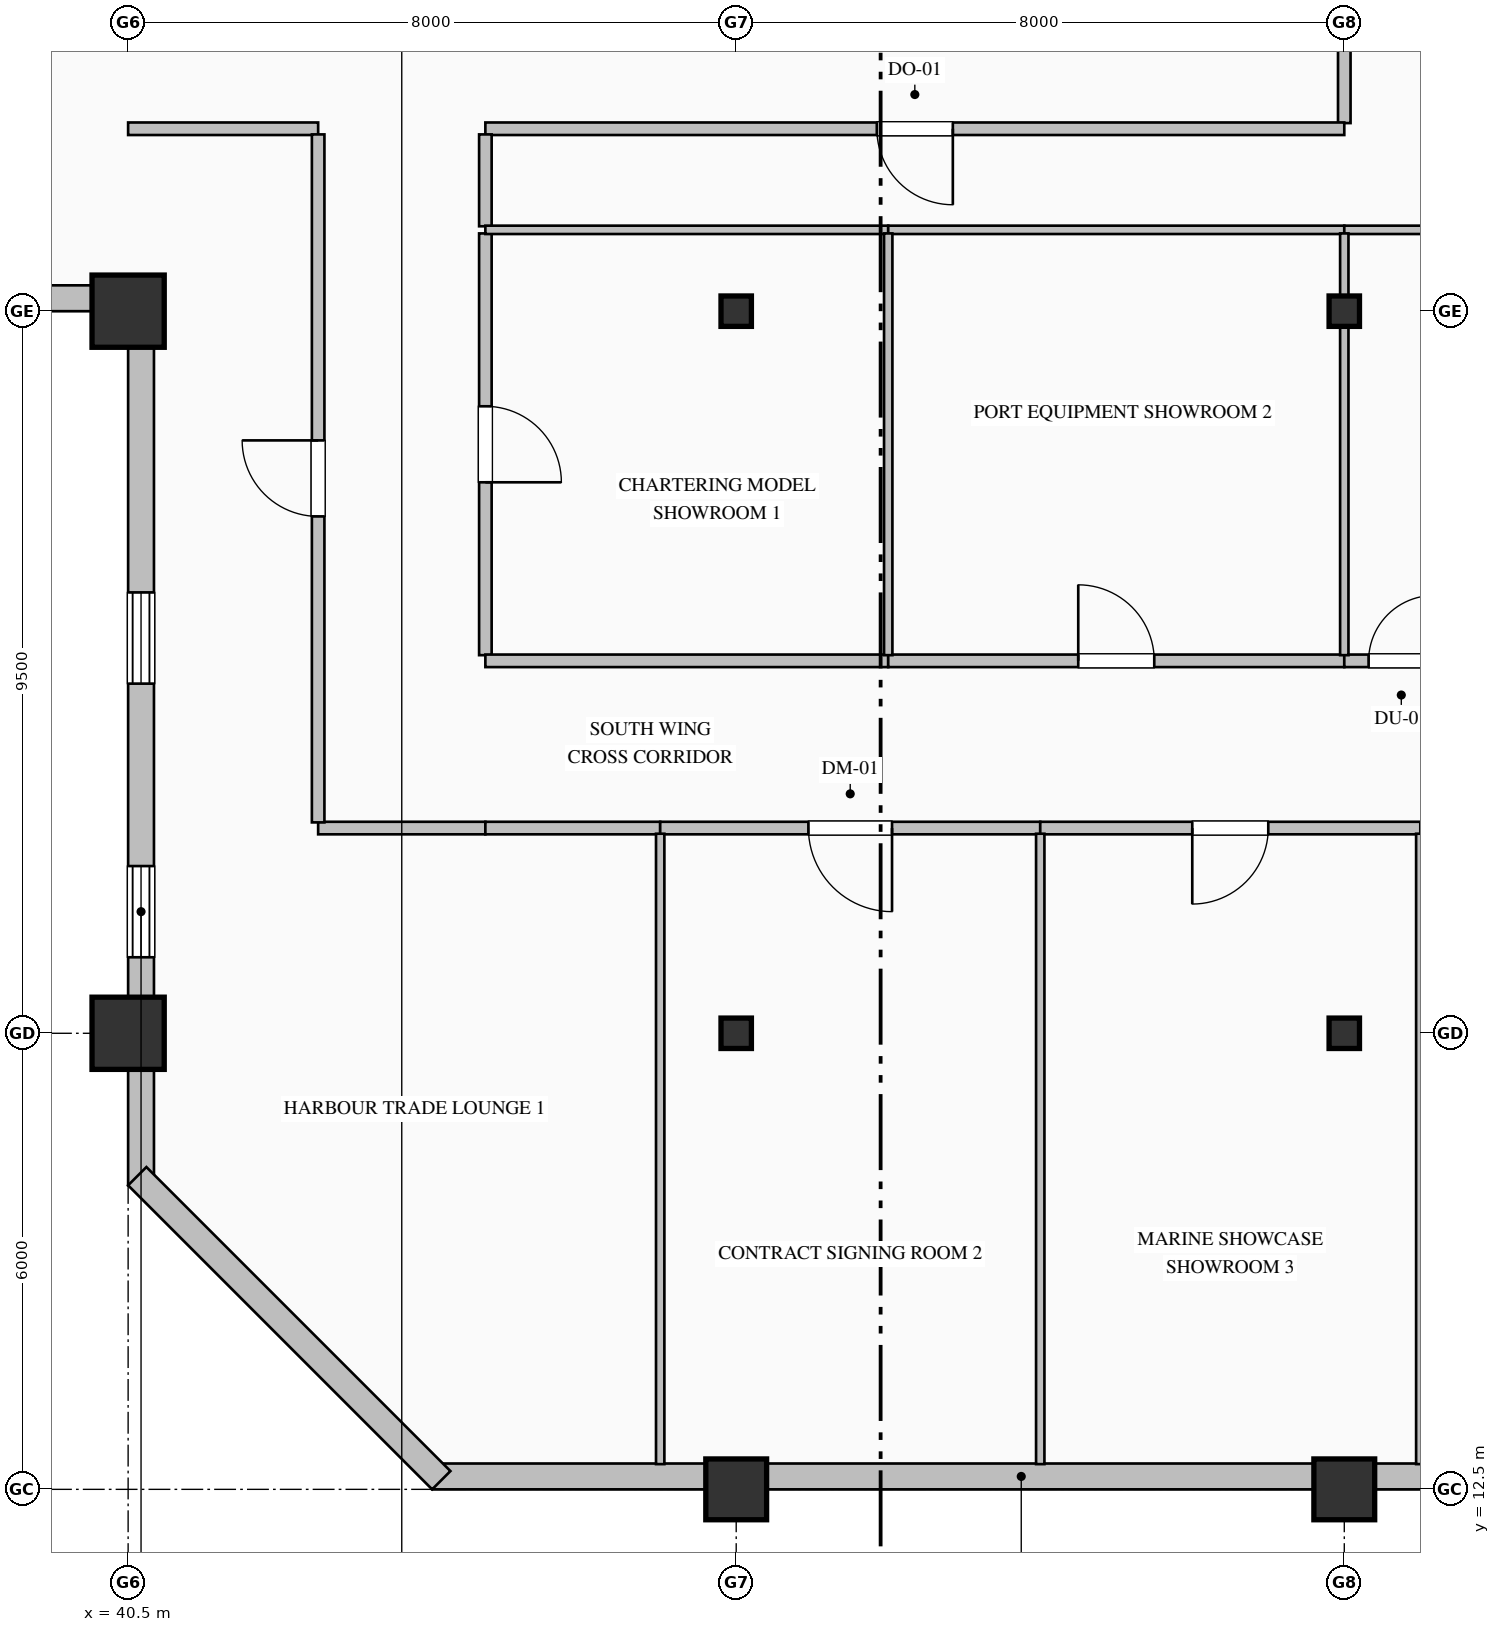
"""IFC4 building model, lengths in metres.
Left out: names, types, materials, properties, quantities, classifications, styles, units other than length and angle.
Written with IfcOpenShell. Run it as: python <this file> out.ifc"""

import sys

from ifc_helpers import new_model, si_unit, direction, frame, frame_2d, origin, origin_2d, place, context, subcontext, project, spatial, rectangle, hollow_rectangle, i_section, extrude, element, fill, save


model = new_model("IFC4")
c1 = context("Model", 3, precision=1e-05, world=origin(), true_north=direction((0.0, 1.0)))
c2 = subcontext(c1, "Body", "Model", "MODEL_VIEW")
j1 = project(units=[si_unit("LENGTHUNIT", "METRE"), si_unit("PLANEANGLEUNIT", "RADIAN")], contexts=[c1])
p1 = place(None, origin())
s1 = spatial("IfcSite", under=j1, at=p1, CompositionType="ELEMENT")
p2 = place(p1, origin())
s2 = spatial("IfcBuilding", under=s1, at=p2, CompositionType="ELEMENT")
p3 = place(p2, frame((0.0, 0.0, 269.8)))
s3 = spatial("IfcBuildingStorey", under=s2, at=p3, CompositionType="ELEMENT", Elevation=269.8)
for number, where, z_axis, x_axis in (
    (1, (40.5, 18.5, 0.0), (0.0, 0.0, 1.0), (1.0, 0.0, 0.0)),
    (2, (40.5, 28.0, 0.0), (0.0, 0.0, 1.0), (1.0, 0.0, 0.0)),
):
    element("IfcColumn", number, at=place(p3, frame(where, z_axis=z_axis, x_axis=x_axis)), inside=s3, PredefinedType="COLUMN", context=c2, shape_type="SweptSolid", body=[
        extrude(hollow_rectangle(XDim=0.95, YDim=0.95, WallThickness=0.036, at=origin_2d()), origin(), (0.0, 0.0, 1.0), 4.0),
    ])
p4 = place(p3, frame((48.5, 12.5, 0.0), z_axis=(0.0, 0.0, 1.0), x_axis=(1.0, 0.0, 0.0)))
e3 = element("IfcColumn", 3, at=p4, inside=s3, PredefinedType="COLUMN", context=c2, shape_type="SweptSolid", body=[
    extrude(hollow_rectangle(XDim=0.8, YDim=0.8, WallThickness=0.032, at=origin_2d()), origin(), (0.0, 0.0, 1.0), 4.0),
])
for number, where, z_axis, x_axis in (
    (4, (48.5, 18.5, 0.0), (0.0, 0.0, 1.0), (1.0, 0.0, 0.0)),
    (5, (48.5, 28.0, 0.0), (0.0, 0.0, 1.0), (1.0, 0.0, 0.0)),
):
    element("IfcColumn", number, at=place(p3, frame(where, z_axis=z_axis, x_axis=x_axis)), inside=s3, PredefinedType="COLUMN", context=c2, shape_type="SweptSolid", body=[
        extrude(i_section(OverallWidth=0.4, OverallDepth=0.4, WebThickness=0.013, FlangeThickness=0.021, FilletRadius=0.022, at=origin_2d()), origin(), (0.0, 0.0, 1.0), 4.0),
    ])
p5 = place(p3, frame((56.5, 12.5, 0.0), z_axis=(0.0, 0.0, 1.0), x_axis=(1.0, 0.0, 0.0)))
e6 = element("IfcColumn", 6, at=p5, inside=s3, PredefinedType="COLUMN", context=c2, shape_type="SweptSolid", body=[
    extrude(hollow_rectangle(XDim=0.8, YDim=0.8, WallThickness=0.032, at=origin_2d()), origin(), (0.0, 0.0, 1.0), 4.0),
])
for number, where, z_axis, x_axis in (
    (7, (56.5, 18.5, 0.0), (0.0, 0.0, 1.0), (1.0, 0.0, 0.0)),
    (8, (56.5, 28.0, 0.0), (0.0, 0.0, 1.0), (1.0, 0.0, 0.0)),
):
    element("IfcColumn", number, at=place(p3, frame(where, z_axis=z_axis, x_axis=x_axis)), inside=s3, PredefinedType="COLUMN", context=c2, shape_type="SweptSolid", body=[
        extrude(i_section(OverallWidth=0.4, OverallDepth=0.4, WebThickness=0.013, FlangeThickness=0.021, FilletRadius=0.022, at=origin_2d()), origin(), (0.0, 0.0, 1.0), 4.0),
    ])
p6 = place(p3, frame((40.67, 16.5, 0.0), z_axis=(0.0, 0.0, 1.0), x_axis=(0.0, 1.0, 0.0)))
e9 = element("IfcWall", 9, at=p6, inside=s3, PredefinedType="SOLIDWALL", context=c2, shape_type="SweptSolid", body=[
    extrude(rectangle(XDim=11.84, YDim=0.34, at=frame_2d((5.92, 0.0))), origin(), (0.0, 0.0, 1.0), 3.187),
])
p7 = place(p6, frame((3.0, 0.0, 0.7)))
e10 = element("IfcOpeningElement", 10, at=p7, cuts=e9, PredefinedType="OPENING", context=c2, shape_type="SweptSolid", body=[
    extrude(rectangle(XDim=1.2, YDim=1.85, at=frame_2d((0.6, 0.925))), frame((0.0, 0.18, 0.0), z_axis=(0.0, -1.0, 0.0), x_axis=(1.0, 0.0, 0.0)), (0.0, 0.0, 1.0), 0.36),
])
p8 = place(p6, frame((6.6, 0.0, 0.9)))
e11 = element("IfcOpeningElement", 11, at=p8, cuts=e9, PredefinedType="OPENING", context=c2, shape_type="SweptSolid", body=[
    extrude(rectangle(XDim=1.2, YDim=1.85, at=frame_2d((0.6, 0.925))), frame((0.0, 0.18, 0.0), z_axis=(0.0, -1.0, 0.0), x_axis=(1.0, 0.0, 0.0)), (0.0, 0.0, 1.0), 0.36),
])
p9 = place(p3, frame((40.52, 28.17, 0.0), z_axis=(0.0, 0.0, 1.0), x_axis=(-1.0, 0.0, 0.0)))
e12 = element("IfcWall", 12, at=p9, inside=s3, PredefinedType="SOLIDWALL", context=c2, shape_type="SweptSolid", body=[
    extrude(rectangle(XDim=27.52, YDim=0.34, at=frame_2d((13.76, 0.0))), origin(), (0.0, 0.0, 1.0), 3.187),
])
p10 = place(p9, frame((10.2, 0.0, 0.7)))
e13 = element("IfcOpeningElement", 13, at=p10, cuts=e12, PredefinedType="OPENING", context=c2, shape_type="SweptSolid", body=[
    extrude(rectangle(XDim=1.2, YDim=1.85, at=frame_2d((0.6, 0.925))), frame((0.0, 0.18, 0.0), z_axis=(0.0, -1.0, 0.0), x_axis=(1.0, 0.0, 0.0)), (0.0, 0.0, 1.0), 0.36),
])
p11 = place(p9, frame((13.8, 0.0, 0.9)))
e14 = element("IfcOpeningElement", 14, at=p11, cuts=e12, PredefinedType="OPENING", context=c2, shape_type="SweptSolid", body=[
    extrude(rectangle(XDim=1.2, YDim=1.85, at=frame_2d((0.6, 0.925))), frame((0.0, 0.18, 0.0), z_axis=(0.0, -1.0, 0.0), x_axis=(1.0, 0.0, 0.0)), (0.0, 0.0, 1.0), 0.36),
])
p12 = place(p9, frame((17.325, 0.0, 0.9)))
e15 = element("IfcOpeningElement", 15, at=p12, cuts=e12, PredefinedType="OPENING", context=c2, shape_type="SweptSolid", body=[
    extrude(rectangle(XDim=1.35, YDim=1.85, at=frame_2d((0.675, 0.925))), frame((0.0, 0.18, 0.0), z_axis=(0.0, -1.0, 0.0), x_axis=(1.0, 0.0, 0.0)), (0.0, 0.0, 1.0), 0.36),
])
p13 = place(p9, frame((21.0, 0.0, 0.7)))
e16 = element("IfcOpeningElement", 16, at=p13, cuts=e12, PredefinedType="OPENING", context=c2, shape_type="SweptSolid", body=[
    extrude(rectangle(XDim=1.2, YDim=1.85, at=frame_2d((0.6, 0.925))), frame((0.0, 0.18, 0.0), z_axis=(0.0, -1.0, 0.0), x_axis=(1.0, 0.0, 0.0)), (0.0, 0.0, 1.0), 0.36),
])
p14 = place(p3, frame((60.0, 12.67, 0.0), z_axis=(0.0, 0.0, 1.0), x_axis=(-1.0, 0.0, 0.0)))
e17 = element("IfcWall", 17, at=p14, inside=s3, PredefinedType="SOLIDWALL", context=c2, shape_type="SweptSolid", body=[
    extrude(rectangle(XDim=15.5, YDim=0.34, at=frame_2d((7.75, 0.0))), origin(), (0.0, 0.0, 1.0), 3.325),
])
p15 = place(p3, frame((44.62, 12.62, 0.0), z_axis=(0.0, 0.0, 1.0), x_axis=(-0.707106781187, 0.707106781187, 0.0)))
e18 = element("IfcWall", 18, at=p15, inside=s3, PredefinedType="SOLIDWALL", context=c2, shape_type="SweptSolid", body=[
    extrude(rectangle(XDim=5.657, YDim=0.34, at=frame_2d((2.828, 0.0))), origin(), (0.0, 0.0, 1.0), 3.775),
])
p16 = place(p3, frame((56.5, 36.0, 0.0), z_axis=(0.0, 0.0, 1.0), x_axis=(0.0, -1.0, 0.0)))
e19 = element("IfcWall", 19, at=p16, inside=s3, PredefinedType="PARTITIONING", context=c2, shape_type="SweptSolid", body=[
    extrude(rectangle(XDim=5.525, YDim=0.165, at=frame_2d((2.763, 0.0))), origin(), (0.0, 0.0, 1.0), 3.179),
])
p17 = place(p3, frame((56.5, 30.4, 0.0), z_axis=(0.0, 0.0, 1.0), x_axis=(-1.0, 0.0, 0.0)))
e20 = element("IfcWall", 20, at=p17, inside=s3, PredefinedType="PARTITIONING", context=c2, shape_type="SweptSolid", body=[
    extrude(rectangle(XDim=11.3, YDim=0.165, at=frame_2d((5.65, 0.0))), origin(), (0.0, 0.0, 1.0), 3.775),
])
p18 = place(p17, frame((5.15, 0.0, 0.0)))
e21 = element("IfcOpeningElement", 21, at=p18, cuts=e20, PredefinedType="OPENING", context=c2, shape_type="SweptSolid", body=[
    extrude(rectangle(XDim=1.0, YDim=2.15, at=frame_2d((0.5, 1.075))), frame((0.0, 0.093, 0.0), z_axis=(0.0, -1.0, 0.0), x_axis=(1.0, 0.0, 0.0)), (0.0, 0.0, 1.0), 0.185),
])
p19 = place(p3, frame((43.0, 30.4, 0.0), z_axis=(0.0, 0.0, 1.0), x_axis=(-1.0, 0.0, 0.0)))
e22 = element("IfcWall", 22, at=p19, inside=s3, PredefinedType="PARTITIONING", context=c2, shape_type="SweptSolid", body=[
    extrude(rectangle(XDim=2.5, YDim=0.165, at=frame_2d((1.25, 0.0))), origin(), (0.0, 0.0, 1.0), 3.775),
])
p20 = place(p3, frame((45.2, 30.325, 0.0), z_axis=(0.0, 0.0, 1.0), x_axis=(0.0, -1.0, 0.0)))
e23 = element("IfcWall", 23, at=p20, inside=s3, PredefinedType="PARTITIONING", context=c2, shape_type="SweptSolid", body=[
    extrude(rectangle(XDim=1.208, YDim=0.165, at=frame_2d((0.604, 0.0))), origin(), (0.0, 0.0, 1.0), 3.775),
])
p21 = place(p3, frame((45.2, 29.023, 0.0), z_axis=(0.0, 0.0, 1.0), x_axis=(0.0, -1.0, 0.0)))
e24 = element("IfcWall", 24, at=p21, inside=s3, PredefinedType="PARTITIONING", context=c2, shape_type="SweptSolid", body=[
    extrude(rectangle(XDim=5.548, YDim=0.165, at=frame_2d((2.774, 0.0))), origin(), (0.0, 0.0, 1.0), 3.775),
])
p22 = place(p21, frame((2.274, 0.0, 0.0)))
e25 = element("IfcOpeningElement", 25, at=p22, cuts=e24, PredefinedType="OPENING", context=c2, shape_type="SweptSolid", body=[
    extrude(rectangle(XDim=1.0, YDim=2.15, at=frame_2d((0.5, 1.075))), frame((0.0, 0.093, 0.0), z_axis=(0.0, -1.0, 0.0), x_axis=(1.0, 0.0, 0.0)), (0.0, 0.0, 1.0), 0.185),
])
p23 = place(p3, frame((45.2, 21.2, 0.0), z_axis=(0.0, 0.0, 1.0), x_axis=(-1.0, 0.0, 0.0)))
e26 = element("IfcWall", 26, at=p23, inside=s3, PredefinedType="PARTITIONING", context=c2, shape_type="SweptSolid", body=[
    extrude(rectangle(XDim=2.2, YDim=0.165, at=frame_2d((1.1, 0.0))), origin(), (0.0, 0.0, 1.0), 3.775),
])
p24 = place(p3, frame((43.0, 21.274, 0.0), z_axis=(0.0, 0.0, 1.0), x_axis=(0.0, 1.0, 0.0)))
e27 = element("IfcWall", 27, at=p24, inside=s3, PredefinedType="PARTITIONING", context=c2, shape_type="SweptSolid", body=[
    extrude(rectangle(XDim=9.051, YDim=0.165, at=frame_2d((4.525, 0.0))), origin(), (0.0, 0.0, 1.0), 3.775),
])
p25 = place(p24, frame((4.025, 0.0, 0.0)))
e28 = element("IfcOpeningElement", 28, at=p25, cuts=e27, PredefinedType="OPENING", context=c2, shape_type="SweptSolid", body=[
    extrude(rectangle(XDim=1.0, YDim=2.15, at=frame_2d((0.5, 1.075))), frame((0.0, 0.093, 0.0), z_axis=(0.0, -1.0, 0.0), x_axis=(1.0, 0.0, 0.0)), (0.0, 0.0, 1.0), 0.185),
])
p26 = place(p3, frame((45.2, 23.4, 0.0), z_axis=(0.0, 0.0, 1.0), x_axis=(1.0, 0.0, 0.0)))
e29 = element("IfcWall", 29, at=p26, inside=s3, PredefinedType="PARTITIONING", context=c2, shape_type="SweptSolid", body=[
    extrude(rectangle(XDim=5.3, YDim=0.165, at=frame_2d((2.65, 0.0))), origin(), (0.0, 0.0, 1.0), 3.467),
])
p27 = place(p3, frame((50.5, 23.4, 0.0), z_axis=(0.0, 0.0, 1.0), x_axis=(1.0, 0.0, 0.0)))
e30 = element("IfcWall", 30, at=p27, inside=s3, PredefinedType="PARTITIONING", context=c2, shape_type="SweptSolid", body=[
    extrude(rectangle(XDim=6.0, YDim=0.165, at=frame_2d((3.0, 0.0))), origin(), (0.0, 0.0, 1.0), 3.467),
])
p28 = place(p27, frame((2.5, 0.0, 0.0)))
e31 = element("IfcOpeningElement", 31, at=p28, cuts=e30, PredefinedType="OPENING", context=c2, shape_type="SweptSolid", body=[
    extrude(rectangle(XDim=1.0, YDim=2.15, at=frame_2d((0.5, 1.075))), frame((0.0, 0.093, 0.0), z_axis=(0.0, -1.0, 0.0), x_axis=(1.0, 0.0, 0.0)), (0.0, 0.0, 1.0), 0.185),
])
p29 = place(p3, frame((56.5, 23.4, 0.0), z_axis=(0.0, 0.0, 1.0), x_axis=(1.0, 0.0, 0.0)))
e32 = element("IfcWall", 32, at=p29, inside=s3, PredefinedType="PARTITIONING", context=c2, shape_type="SweptSolid", body=[
    extrude(rectangle(XDim=1.5, YDim=0.165, at=frame_2d((0.75, 0.0))), origin(), (0.0, 0.0, 1.0), 3.775),
])
p30 = place(p29, frame((0.32, 0.0, 0.0)))
e33 = element("IfcOpeningElement", 33, at=p30, cuts=e32, PredefinedType="OPENING", context=c2, shape_type="SweptSolid", body=[
    extrude(rectangle(XDim=0.86, YDim=2.1, at=frame_2d((0.43, 1.05))), frame((0.0, 0.093, 0.0), z_axis=(0.0, -1.0, 0.0), x_axis=(1.0, 0.0, 0.0)), (0.0, 0.0, 1.0), 0.185),
])
p31 = place(p3, frame((47.5, 21.2, 0.0), z_axis=(0.0, 0.0, 1.0), x_axis=(-1.0, 0.0, 0.0)))
e34 = element("IfcWall", 34, at=p31, inside=s3, PredefinedType="PARTITIONING", context=c2, shape_type="SweptSolid", body=[
    extrude(rectangle(XDim=2.3, YDim=0.165, at=frame_2d((1.15, 0.0))), origin(), (0.0, 0.0, 1.0), 3.775),
])
p32 = place(p3, frame((52.5, 21.2, 0.0), z_axis=(0.0, 0.0, 1.0), x_axis=(-1.0, 0.0, 0.0)))
e35 = element("IfcWall", 35, at=p32, inside=s3, PredefinedType="PARTITIONING", context=c2, shape_type="SweptSolid", body=[
    extrude(rectangle(XDim=5.0, YDim=0.165, at=frame_2d((2.5, 0.0))), origin(), (0.0, 0.0, 1.0), 3.775),
])
p33 = place(p32, frame((1.95, 0.0, 0.0)))
e36 = element("IfcOpeningElement", 36, at=p33, cuts=e35, PredefinedType="OPENING", context=c2, shape_type="SweptSolid", body=[
    extrude(rectangle(XDim=1.1, YDim=2.2, at=frame_2d((0.55, 1.1))), frame((0.0, 0.093, 0.0), z_axis=(0.0, -1.0, 0.0), x_axis=(1.0, 0.0, 0.0)), (0.0, 0.0, 1.0), 0.185),
])
p34 = place(p3, frame((57.5, 21.2, 0.0), z_axis=(0.0, 0.0, 1.0), x_axis=(-1.0, 0.0, 0.0)))
e37 = element("IfcWall", 37, at=p34, inside=s3, PredefinedType="PARTITIONING", context=c2, shape_type="SweptSolid", body=[
    extrude(rectangle(XDim=5.0, YDim=0.165, at=frame_2d((2.5, 0.0))), origin(), (0.0, 0.0, 1.0), 3.775),
])
p35 = place(p34, frame((2.0, 0.0, 0.0)))
e38 = element("IfcOpeningElement", 38, at=p35, cuts=e37, PredefinedType="OPENING", context=c2, shape_type="SweptSolid", body=[
    extrude(rectangle(XDim=1.0, YDim=2.15, at=frame_2d((0.5, 1.075))), frame((0.0, 0.093, 0.0), z_axis=(0.0, -1.0, 0.0), x_axis=(1.0, 0.0, 0.0)), (0.0, 0.0, 1.0), 0.185),
])
p36 = place(p3, frame((50.5, 29.07, 0.0), z_axis=(0.0, 0.0, 1.0), x_axis=(-1.0, 0.0, 0.0)))
e39 = element("IfcWall", 39, at=p36, inside=s3, PredefinedType="MOVABLE", context=c2, shape_type="SweptSolid", body=[
    extrude(rectangle(XDim=5.3, YDim=0.11, at=frame_2d((2.65, 0.0))), origin(), (0.0, 0.0, 1.0), 3.775),
])
p37 = place(p3, frame((56.5, 29.07, 0.0), z_axis=(0.0, 0.0, 1.0), x_axis=(-1.0, 0.0, 0.0)))
e40 = element("IfcWall", 40, at=p37, inside=s3, PredefinedType="MOVABLE", context=c2, shape_type="SweptSolid", body=[
    extrude(rectangle(XDim=6.0, YDim=0.11, at=frame_2d((3.0, 0.0))), origin(), (0.0, 0.0, 1.0), 3.775),
])
p38 = place(p3, frame((63.668, 29.07, 0.0), z_axis=(0.0, 0.0, 1.0), x_axis=(-1.0, 0.0, 0.0)))
e41 = element("IfcWall", 41, at=p38, inside=s3, PredefinedType="MOVABLE", context=c2, shape_type="SweptSolid", body=[
    extrude(rectangle(XDim=7.168, YDim=0.11, at=frame_2d((3.584, 0.0))), origin(), (0.0, 0.0, 1.0), 3.775),
])
p39 = place(p3, frame((50.5, 29.023, 0.0), z_axis=(0.0, 0.0, 1.0), x_axis=(0.0, -1.0, 0.0)))
e42 = element("IfcWall", 42, at=p39, inside=s3, PredefinedType="MOVABLE", context=c2, shape_type="SweptSolid", body=[
    extrude(rectangle(XDim=5.548, YDim=0.11, at=frame_2d((2.774, 0.0))), origin(), (0.0, 0.0, 1.0), 3.775),
])
p40 = place(p3, frame((56.5, 29.023, 0.0), z_axis=(0.0, 0.0, 1.0), x_axis=(0.0, -1.0, 0.0)))
e43 = element("IfcWall", 43, at=p40, inside=s3, PredefinedType="MOVABLE", context=c2, shape_type="SweptSolid", body=[
    extrude(rectangle(XDim=5.548, YDim=0.11, at=frame_2d((2.774, 0.0))), origin(), (0.0, 0.0, 1.0), 2.967),
])
for number, where, z_axis, x_axis in (
    (44, (47.5, 21.125, 0.0), (0.0, 0.0, 1.0), (0.0, -1.0, 0.0)),
    (45, (52.5, 21.125, 0.0), (0.0, 0.0, 1.0), (0.0, -1.0, 0.0)),
    (46, (57.5, 21.125, 0.0), (0.0, 0.0, 1.0), (0.0, -1.0, 0.0)),
):
    element("IfcWall", number, at=place(p3, frame(where, z_axis=z_axis, x_axis=x_axis)), inside=s3, PredefinedType="MOVABLE", context=c2, shape_type="SweptSolid", body=[
        extrude(rectangle(XDim=8.293, YDim=0.11, at=frame_2d((4.147, 0.0))), origin(), (0.0, 0.0, 1.0), 3.775),
    ])
p41 = place(p7, origin())
e47 = element("IfcWindow", 47, at=p41, inside=s3, PartitioningType="DOUBLE_PANEL_VERTICAL", PredefinedType="WINDOW", context=c2, shape_type="SweptSolid", body=[
    extrude(rectangle(XDim=1.2, YDim=1.85, at=frame_2d((0.6, 0.925))), frame((0.0, 0.15, 0.0), z_axis=(0.0, -1.0, 0.0), x_axis=(1.0, 0.0, 0.0)), (0.0, 0.0, 1.0), 0.06),
])
fill(e10, e47)
p42 = place(p8, origin())
e48 = element("IfcWindow", 48, at=p42, inside=s3, PartitioningType="DOUBLE_PANEL_VERTICAL", PredefinedType="WINDOW", context=c2, shape_type="SweptSolid", body=[
    extrude(rectangle(XDim=1.2, YDim=1.85, at=frame_2d((0.6, 0.925))), frame((0.0, 0.15, 0.0), z_axis=(0.0, -1.0, 0.0), x_axis=(1.0, 0.0, 0.0)), (0.0, 0.0, 1.0), 0.06),
])
fill(e11, e48)
p43 = place(p18, origin())
e49 = element("IfcDoor", 49, at=p43, inside=s3, OperationType="SINGLE_SWING_LEFT", PredefinedType="DOOR", context=c2, shape_type="SweptSolid", body=[
    extrude(rectangle(XDim=1.0, YDim=2.15, at=frame_2d((0.5, 1.075))), frame((0.0, 0.025, 0.0), z_axis=(0.0, -1.0, 0.0), x_axis=(1.0, 0.0, 0.0)), (0.0, 0.0, 1.0), 0.05),
])
fill(e21, e49)
p44 = place(p22, origin())
e50 = element("IfcDoor", 50, at=p44, inside=s3, OperationType="SINGLE_SWING_RIGHT", PredefinedType="DOOR", context=c2, shape_type="SweptSolid", body=[
    extrude(rectangle(XDim=1.0, YDim=2.15, at=frame_2d((0.5, 1.075))), frame((0.0, 0.025, 0.0), z_axis=(0.0, -1.0, 0.0), x_axis=(1.0, 0.0, 0.0)), (0.0, 0.0, 1.0), 0.05),
])
fill(e25, e50)
p45 = place(p28, origin())
e51 = element("IfcDoor", 51, at=p45, inside=s3, OperationType="SINGLE_SWING_LEFT", PredefinedType="DOOR", context=c2, shape_type="SweptSolid", body=[
    extrude(rectangle(XDim=1.0, YDim=2.15, at=frame_2d((0.5, 1.075))), frame((0.0, 0.025, 0.0), z_axis=(0.0, -1.0, 0.0), x_axis=(1.0, 0.0, 0.0)), (0.0, 0.0, 1.0), 0.05),
])
fill(e31, e51)
p46 = place(p30, origin())
e52 = element("IfcDoor", 52, at=p46, inside=s3, OperationType="SINGLE_SWING_RIGHT", PredefinedType="DOOR", context=c2, shape_type="SweptSolid", body=[
    extrude(rectangle(XDim=0.86, YDim=2.1, at=frame_2d((0.43, 1.05))), frame((0.0, 0.025, 0.0), z_axis=(0.0, -1.0, 0.0), x_axis=(1.0, 0.0, 0.0)), (0.0, 0.0, 1.0), 0.05),
])
fill(e33, e52)
p47 = place(p25, origin())
e53 = element("IfcDoor", 53, at=p47, inside=s3, OperationType="SINGLE_SWING_RIGHT", PredefinedType="DOOR", context=c2, shape_type="SweptSolid", body=[
    extrude(rectangle(XDim=1.0, YDim=2.15, at=frame_2d((0.5, 1.075))), frame((0.0, 0.025, 0.0), z_axis=(0.0, -1.0, 0.0), x_axis=(1.0, 0.0, 0.0)), (0.0, 0.0, 1.0), 0.05),
])
fill(e28, e53)
p48 = place(p33, origin())
e54 = element("IfcDoor", 54, at=p48, inside=s3, OperationType="SINGLE_SWING_LEFT", PredefinedType="DOOR", context=c2, shape_type="SweptSolid", body=[
    extrude(rectangle(XDim=1.1, YDim=2.2, at=frame_2d((0.55, 1.1))), frame((0.0, 0.025, 0.0), z_axis=(0.0, -1.0, 0.0), x_axis=(1.0, 0.0, 0.0)), (0.0, 0.0, 1.0), 0.05),
])
fill(e36, e54)
p49 = place(p35, origin())
e55 = element("IfcDoor", 55, at=p49, inside=s3, OperationType="SINGLE_SWING_RIGHT", PredefinedType="DOOR", context=c2, shape_type="SweptSolid", body=[
    extrude(rectangle(XDim=1.0, YDim=2.15, at=frame_2d((0.5, 1.075))), frame((0.0, 0.025, 0.0), z_axis=(0.0, -1.0, 0.0), x_axis=(1.0, 0.0, 0.0)), (0.0, 0.0, 1.0), 0.05),
])
fill(e38, e55)
save(model, sys.argv[1])
